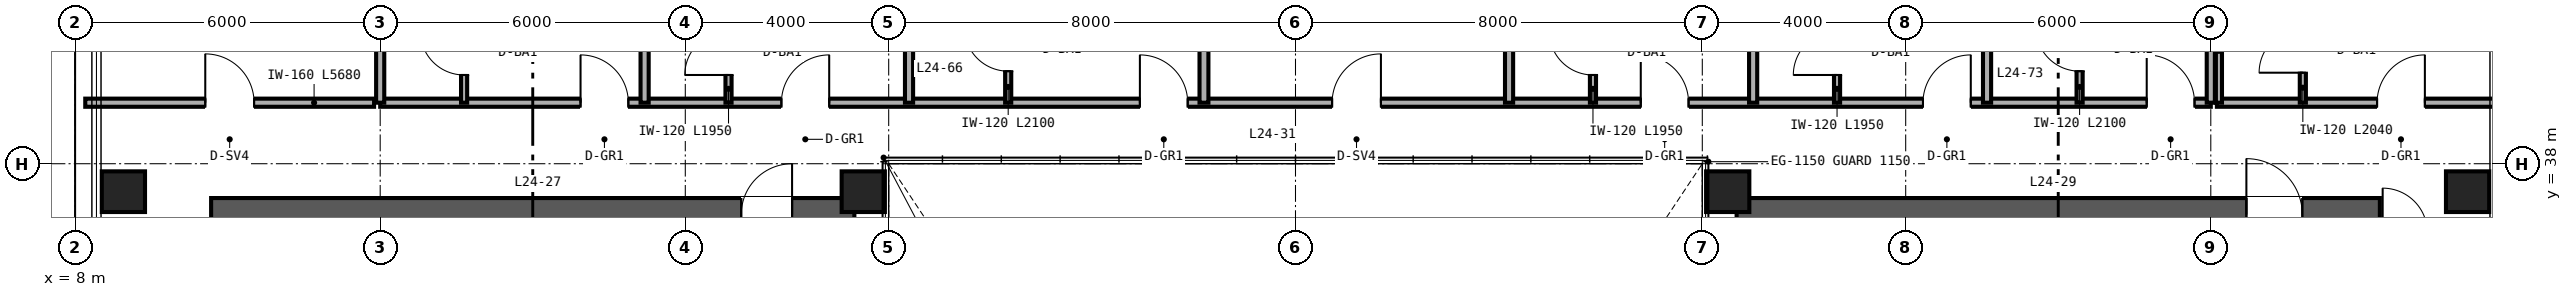
"""IFC4 building model, lengths in metres.
Left out: names, types, materials, properties, quantities, classifications, styles, units other than length and angle.
Written with IfcOpenShell. Run it as: python <this file> out.ifc"""

import sys

from ifc_helpers import new_model, si_unit, direction, frame, frame_2d, origin, origin_2d, place, context, subcontext, project, spatial, rectangle, hollow_rectangle, extrude, source, transform, mapped, element, fill, save


model = new_model("IFC4")
c1 = context("Model", 3, precision=1e-05, world=origin(), true_north=direction((0.0, 1.0)))
c2 = subcontext(c1, "Body", "Model", "MODEL_VIEW")
j1 = project(units=[si_unit("LENGTHUNIT", "METRE"), si_unit("PLANEANGLEUNIT", "RADIAN")], contexts=[c1])
p1 = place(None, origin())
s1 = spatial("IfcSite", under=j1, at=p1, CompositionType="ELEMENT")
p2 = place(p1, origin())
s2 = spatial("IfcBuilding", under=s1, at=p2, CompositionType="ELEMENT")
p3 = place(p2, frame((0.0, 0.0, 100.8)))
s3 = spatial("IfcBuildingStorey", under=s2, at=p3, CompositionType="ELEMENT", Elevation=100.8)
p4 = place(p3, frame((10.675, 37.0, 0.0), z_axis=(0.0, 0.0, 1.0), x_axis=(1.0, 0.0, 0.0)))
e1 = element("IfcWall", 1, at=p4, inside=s3, PredefinedType="SHEAR", context=c2, shape_type="SweptSolid", body=[
    extrude(rectangle(XDim=12.65, YDim=0.65, at=frame_2d((6.325, 0.0))), origin(), (0.0, 0.0, 1.0), 3.36),
])
p5 = place(p4, frame((10.425, 0.0, 0.0)))
e2 = element("IfcOpeningElement", 2, at=p5, cuts=e1, PredefinedType="OPENING", context=c2, shape_type="SweptSolid", body=[
    extrude(rectangle(XDim=1.0, YDim=2.15, at=frame_2d((0.5, 1.075))), frame((0.0, 0.335, 0.0), z_axis=(0.0, -1.0, 0.0), x_axis=(1.0, 0.0, 0.0)), (0.0, 0.0, 1.0), 0.67),
])
p6 = place(p3, frame((40.675, 37.0, 0.0), z_axis=(0.0, 0.0, 1.0), x_axis=(1.0, 0.0, 0.0)))
e3 = element("IfcWall", 3, at=p6, inside=s3, PredefinedType="SHEAR", context=c2, shape_type="SweptSolid", body=[
    extrude(rectangle(XDim=12.65, YDim=0.65, at=frame_2d((6.325, 0.0))), origin(), (0.0, 0.0, 1.0), 3.36),
])
p7 = place(p6, frame((10.025, 0.0, 0.0)))
e4 = element("IfcOpeningElement", 4, at=p7, cuts=e3, PredefinedType="OPENING", context=c2, shape_type="SweptSolid", body=[
    extrude(rectangle(XDim=1.1, YDim=2.15, at=frame_2d((0.55, 1.075))), frame((0.0, 0.335, 0.0), z_axis=(0.0, -1.0, 0.0), x_axis=(1.0, 0.0, 0.0)), (0.0, 0.0, 1.0), 0.67),
])
m1 = source(origin(), c2, "Body", "SweptSolid", [
    extrude(hollow_rectangle(XDim=0.85, YDim=0.8, WallThickness=0.032, at=origin_2d()), origin(), (0.0, 0.0, 1.0), 3.36),
])
for number, where, z_axis, x_axis in (
    (5, (8.95, 37.45, 0.0), (0.0, 0.0, 1.0), (1.0, 0.0, 0.0)),
    (6, (23.5, 37.45, 0.0), (0.0, 0.0, 1.0), (1.0, 0.0, 0.0)),
    (7, (40.5, 37.45, 0.0), (0.0, 0.0, 1.0), (1.0, 0.0, 0.0)),
    (8, (55.05, 37.45, 0.0), (0.0, 0.0, 1.0), (1.0, 0.0, 0.0)),
):
    element("IfcColumn", number, at=place(p3, frame(where, z_axis=z_axis, x_axis=x_axis)), inside=s3, PredefinedType="COLUMN", context=c2, shape_type="MappedRepresentation", body=[
        mapped(m1, transform((0.0, 0.0, 0.0), scale=1.0)),
    ])
p8 = place(p3, frame((8.2, 39.2, 0.0), z_axis=(0.0, 0.0, 1.0), x_axis=(1.0, 0.0, 0.0)))
e9 = element("IfcWall", 9, at=p8, inside=s3, PredefinedType="PARTITIONING", context=c2, shape_type="SweptSolid", body=[
    extrude(rectangle(XDim=5.68, YDim=0.16, at=frame_2d((2.84, 0.0))), origin(), (0.0, 0.0, 1.0), 3.36),
])
p9 = place(p8, frame((2.36, 0.0, 0.0)))
e10 = element("IfcOpeningElement", 10, at=p9, cuts=e9, PredefinedType="OPENING", context=c2, shape_type="SweptSolid", body=[
    extrude(rectangle(XDim=0.96, YDim=2.15, at=frame_2d((0.48, 1.075))), frame((0.0, 0.09, 0.0), z_axis=(0.0, -1.0, 0.0), x_axis=(1.0, 0.0, 0.0)), (0.0, 0.0, 1.0), 0.18),
])
p10 = place(p3, frame((50.12, 39.2, 0.0), z_axis=(0.0, 0.0, 1.0), x_axis=(1.0, 0.0, 0.0)))
e11 = element("IfcWall", 11, at=p10, inside=s3, PredefinedType="PARTITIONING", context=c2, shape_type="SweptSolid", body=[
    extrude(rectangle(XDim=5.68, YDim=0.16, at=frame_2d((2.84, 0.0))), origin(), (0.0, 0.0, 1.0), 3.36),
])
p11 = place(p10, frame((3.15, 0.0, 0.0)))
e12 = element("IfcOpeningElement", 12, at=p11, cuts=e11, PredefinedType="OPENING", context=c2, shape_type="SweptSolid", body=[
    extrude(rectangle(XDim=0.94, YDim=2.15, at=frame_2d((0.47, 1.075))), frame((0.0, 0.09, 0.0), z_axis=(0.0, -1.0, 0.0), x_axis=(1.0, 0.0, 0.0)), (0.0, 0.0, 1.0), 0.18),
])
p12 = place(p3, frame((51.81, 39.2, 0.0), z_axis=(0.0, 0.0, 1.0), x_axis=(0.0, 1.0, 0.0)))
e13 = element("IfcWall", 13, at=p12, inside=s3, PredefinedType="PARTITIONING", context=c2, shape_type="SweptSolid", body=[
    extrude(rectangle(XDim=2.04, YDim=0.12, at=frame_2d((1.02, 0.0))), origin(), (0.0, 0.0, 1.0), 3.36),
])
p13 = place(p12, frame((0.59, 0.0, 0.0)))
e14 = element("IfcOpeningElement", 14, at=p13, cuts=e13, PredefinedType="OPENING", context=c2, shape_type="SweptSolid", body=[
    extrude(rectangle(XDim=0.86, YDim=2.1, at=frame_2d((0.43, 1.05))), frame((0.0, 0.07, 0.0), z_axis=(0.0, -1.0, 0.0), x_axis=(1.0, 0.0, 0.0)), (0.0, 0.0, 1.0), 0.14),
])
p14 = place(p3, frame((50.16, 39.2, 0.0), z_axis=(0.0, 0.0, 1.0), x_axis=(0.0, 1.0, 0.0)))
e15 = element("IfcWall", 15, at=p14, inside=s3, PredefinedType="PARTITIONING", context=c2, shape_type="SweptSolid", body=[
    extrude(rectangle(XDim=2.04, YDim=0.12, at=frame_2d((1.02, 0.0))), origin(), (0.0, 0.0, 1.0), 3.36),
])
p15 = place(p3, frame((14.0, 39.2, 0.0), z_axis=(0.0, 0.0, 1.0), x_axis=(1.0, 0.0, 0.0)))
e16 = element("IfcWall", 16, at=p15, inside=s3, PredefinedType="PARTITIONING", context=c2, shape_type="SweptSolid", body=[
    extrude(rectangle(XDim=36.0, YDim=0.16, at=frame_2d((18.0, 0.0))), origin(), (0.0, 0.0, 1.0), 2.581),
])
p16 = place(p15, frame((3.94, 0.0, 0.0)))
e17 = element("IfcOpeningElement", 17, at=p16, cuts=e16, PredefinedType="OPENING", context=c2, shape_type="SweptSolid", body=[
    extrude(rectangle(XDim=0.94, YDim=2.15, at=frame_2d((0.47, 1.075))), frame((0.0, 0.09, 0.0), z_axis=(0.0, -1.0, 0.0), x_axis=(1.0, 0.0, 0.0)), (0.0, 0.0, 1.0), 0.18),
])
p17 = place(p15, frame((7.89, 0.0, 0.0)))
e18 = element("IfcOpeningElement", 18, at=p17, cuts=e16, PredefinedType="OPENING", context=c2, shape_type="SweptSolid", body=[
    extrude(rectangle(XDim=0.94, YDim=2.15, at=frame_2d((0.47, 1.075))), frame((0.0, 0.09, 0.0), z_axis=(0.0, -1.0, 0.0), x_axis=(1.0, 0.0, 0.0)), (0.0, 0.0, 1.0), 0.18),
])
p18 = place(p15, frame((14.94, 0.0, 0.0)))
e19 = element("IfcOpeningElement", 19, at=p18, cuts=e16, PredefinedType="OPENING", context=c2, shape_type="SweptSolid", body=[
    extrude(rectangle(XDim=0.94, YDim=2.15, at=frame_2d((0.47, 1.075))), frame((0.0, 0.09, 0.0), z_axis=(0.0, -1.0, 0.0), x_axis=(1.0, 0.0, 0.0)), (0.0, 0.0, 1.0), 0.18),
])
p19 = place(p15, frame((18.72, 0.0, 0.0)))
e20 = element("IfcOpeningElement", 20, at=p19, cuts=e16, PredefinedType="OPENING", context=c2, shape_type="SweptSolid", body=[
    extrude(rectangle(XDim=0.96, YDim=2.15, at=frame_2d((0.48, 1.075))), frame((0.0, 0.09, 0.0), z_axis=(0.0, -1.0, 0.0), x_axis=(1.0, 0.0, 0.0)), (0.0, 0.0, 1.0), 0.18),
])
p20 = place(p15, frame((24.79, 0.0, 0.0)))
e21 = element("IfcOpeningElement", 21, at=p20, cuts=e16, PredefinedType="OPENING", context=c2, shape_type="SweptSolid", body=[
    extrude(rectangle(XDim=0.94, YDim=2.15, at=frame_2d((0.47, 1.075))), frame((0.0, 0.09, 0.0), z_axis=(0.0, -1.0, 0.0), x_axis=(1.0, 0.0, 0.0)), (0.0, 0.0, 1.0), 0.18),
])
p21 = place(p15, frame((30.34, 0.0, 0.0)))
e22 = element("IfcOpeningElement", 22, at=p21, cuts=e16, PredefinedType="OPENING", context=c2, shape_type="SweptSolid", body=[
    extrude(rectangle(XDim=0.94, YDim=2.15, at=frame_2d((0.47, 1.075))), frame((0.0, 0.09, 0.0), z_axis=(0.0, -1.0, 0.0), x_axis=(1.0, 0.0, 0.0)), (0.0, 0.0, 1.0), 0.18),
])
p22 = place(p15, frame((34.74, 0.0, 0.0)))
e23 = element("IfcOpeningElement", 23, at=p22, cuts=e16, PredefinedType="OPENING", context=c2, shape_type="SweptSolid", body=[
    extrude(rectangle(XDim=0.94, YDim=2.15, at=frame_2d((0.47, 1.075))), frame((0.0, 0.09, 0.0), z_axis=(0.0, -1.0, 0.0), x_axis=(1.0, 0.0, 0.0)), (0.0, 0.0, 1.0), 0.18),
])
for number, where, z_axis, x_axis in (
    (24, (14.0, 39.2, 0.0), (0.0, 0.0, 1.0), (0.0, 1.0, 0.0)),
    (25, (50.0, 39.2, 0.0), (0.0, 0.0, 1.0), (0.0, 1.0, 0.0)),
    (26, (19.2, 39.2, 0.0), (0.0, 0.0, 1.0), (0.0, 1.0, 0.0)),
):
    element("IfcWall", number, at=place(p3, frame(where, z_axis=z_axis, x_axis=x_axis)), inside=s3, PredefinedType="PARTITIONING", context=c2, shape_type="SweptSolid", body=[
        extrude(rectangle(XDim=10.44, YDim=0.16, at=frame_2d((5.22, 0.0))), origin(), (0.0, 0.0, 1.0), 2.667),
    ])
p23 = place(p3, frame((15.65, 39.2, 0.0), z_axis=(0.0, 0.0, 1.0), x_axis=(0.0, 1.0, 0.0)))
e27 = element("IfcWall", 27, at=p23, inside=s3, PredefinedType="PARTITIONING", context=c2, shape_type="SweptSolid", body=[
    extrude(rectangle(XDim=1.95, YDim=0.12, at=frame_2d((0.975, 0.0))), origin(), (0.0, 0.0, 1.0), 3.36),
])
p24 = place(p23, frame((0.545, 0.0, 0.0)))
e28 = element("IfcOpeningElement", 28, at=p24, cuts=e27, PredefinedType="OPENING", context=c2, shape_type="SweptSolid", body=[
    extrude(rectangle(XDim=0.86, YDim=2.1, at=frame_2d((0.43, 1.05))), frame((0.0, 0.07, 0.0), z_axis=(0.0, -1.0, 0.0), x_axis=(1.0, 0.0, 0.0)), (0.0, 0.0, 1.0), 0.14),
])
p25 = place(p3, frame((24.4, 39.2, 0.0), z_axis=(0.0, 0.0, 1.0), x_axis=(0.0, 1.0, 0.0)))
e29 = element("IfcWall", 29, at=p25, inside=s3, PredefinedType="PARTITIONING", context=c2, shape_type="SweptSolid", body=[
    extrude(rectangle(XDim=10.44, YDim=0.16, at=frame_2d((5.22, 0.0))), origin(), (0.0, 0.0, 1.0), 2.433),
])
p26 = place(p3, frame((20.85, 39.2, 0.0), z_axis=(0.0, 0.0, 1.0), x_axis=(0.0, 1.0, 0.0)))
e30 = element("IfcWall", 30, at=p26, inside=s3, PredefinedType="PARTITIONING", context=c2, shape_type="SweptSolid", body=[
    extrude(rectangle(XDim=1.95, YDim=0.12, at=frame_2d((0.975, 0.0))), origin(), (0.0, 0.0, 1.0), 3.36),
])
p27 = place(p26, frame((0.545, 0.0, 0.0)))
e31 = element("IfcOpeningElement", 31, at=p27, cuts=e30, PredefinedType="OPENING", context=c2, shape_type="SweptSolid", body=[
    extrude(rectangle(XDim=0.86, YDim=2.1, at=frame_2d((0.43, 1.05))), frame((0.0, 0.07, 0.0), z_axis=(0.0, -1.0, 0.0), x_axis=(1.0, 0.0, 0.0)), (0.0, 0.0, 1.0), 0.14),
])
p28 = place(p3, frame((30.2, 39.2, 0.0), z_axis=(0.0, 0.0, 1.0), x_axis=(0.0, 1.0, 0.0)))
e32 = element("IfcWall", 32, at=p28, inside=s3, PredefinedType="PARTITIONING", context=c2, shape_type="SweptSolid", body=[
    extrude(rectangle(XDim=10.44, YDim=0.175, at=frame_2d((5.22, 0.0))), origin(), (0.0, 0.0, 1.0), 2.433),
])
p29 = place(p3, frame((26.35, 39.2, 0.0), z_axis=(0.0, 0.0, 1.0), x_axis=(0.0, 1.0, 0.0)))
e33 = element("IfcWall", 33, at=p29, inside=s3, PredefinedType="PARTITIONING", context=c2, shape_type="SweptSolid", body=[
    extrude(rectangle(XDim=2.1, YDim=0.12, at=frame_2d((1.05, 0.0))), origin(), (0.0, 0.0, 1.0), 3.36),
])
p30 = place(p29, frame((0.62, 0.0, 0.0)))
e34 = element("IfcOpeningElement", 34, at=p30, cuts=e33, PredefinedType="OPENING", context=c2, shape_type="SweptSolid", body=[
    extrude(rectangle(XDim=0.86, YDim=2.1, at=frame_2d((0.43, 1.05))), frame((0.0, 0.07, 0.0), z_axis=(0.0, -1.0, 0.0), x_axis=(1.0, 0.0, 0.0)), (0.0, 0.0, 1.0), 0.14),
])
p31 = place(p3, frame((36.2, 39.2, 0.0), z_axis=(0.0, 0.0, 1.0), x_axis=(0.0, 1.0, 0.0)))
e35 = element("IfcWall", 35, at=p31, inside=s3, PredefinedType="PARTITIONING", context=c2, shape_type="SweptSolid", body=[
    extrude(rectangle(XDim=10.44, YDim=0.16, at=frame_2d((5.22, 0.0))), origin(), (0.0, 0.0, 1.0), 2.433),
])
p32 = place(p3, frame((41.0, 39.2, 0.0), z_axis=(0.0, 0.0, 1.0), x_axis=(0.0, 1.0, 0.0)))
e36 = element("IfcWall", 36, at=p32, inside=s3, PredefinedType="PARTITIONING", context=c2, shape_type="SweptSolid", body=[
    extrude(rectangle(XDim=10.44, YDim=0.16, at=frame_2d((5.22, 0.0))), origin(), (0.0, 0.0, 1.0), 2.823),
])
p33 = place(p3, frame((37.85, 39.2, 0.0), z_axis=(0.0, 0.0, 1.0), x_axis=(0.0, 1.0, 0.0)))
e37 = element("IfcWall", 37, at=p33, inside=s3, PredefinedType="PARTITIONING", context=c2, shape_type="SweptSolid", body=[
    extrude(rectangle(XDim=1.95, YDim=0.12, at=frame_2d((0.975, 0.0))), origin(), (0.0, 0.0, 1.0), 3.36),
])
p34 = place(p33, frame((0.545, 0.0, 0.0)))
e38 = element("IfcOpeningElement", 38, at=p34, cuts=e37, PredefinedType="OPENING", context=c2, shape_type="SweptSolid", body=[
    extrude(rectangle(XDim=0.86, YDim=2.1, at=frame_2d((0.43, 1.05))), frame((0.0, 0.07, 0.0), z_axis=(0.0, -1.0, 0.0), x_axis=(1.0, 0.0, 0.0)), (0.0, 0.0, 1.0), 0.14),
])
p35 = place(p3, frame((45.6, 39.2, 0.0), z_axis=(0.0, 0.0, 1.0), x_axis=(0.0, 1.0, 0.0)))
e39 = element("IfcWall", 39, at=p35, inside=s3, PredefinedType="PARTITIONING", context=c2, shape_type="SweptSolid", body=[
    extrude(rectangle(XDim=10.44, YDim=0.16, at=frame_2d((5.22, 0.0))), origin(), (0.0, 0.0, 1.0), 2.667),
])
p36 = place(p3, frame((42.65, 39.2, 0.0), z_axis=(0.0, 0.0, 1.0), x_axis=(0.0, 1.0, 0.0)))
e40 = element("IfcWall", 40, at=p36, inside=s3, PredefinedType="PARTITIONING", context=c2, shape_type="SweptSolid", body=[
    extrude(rectangle(XDim=1.95, YDim=0.12, at=frame_2d((0.975, 0.0))), origin(), (0.0, 0.0, 1.0), 3.36),
])
p37 = place(p36, frame((0.545, 0.0, 0.0)))
e41 = element("IfcOpeningElement", 41, at=p37, cuts=e40, PredefinedType="OPENING", context=c2, shape_type="SweptSolid", body=[
    extrude(rectangle(XDim=0.86, YDim=2.1, at=frame_2d((0.43, 1.05))), frame((0.0, 0.07, 0.0), z_axis=(0.0, -1.0, 0.0), x_axis=(1.0, 0.0, 0.0)), (0.0, 0.0, 1.0), 0.14),
])
p38 = place(p3, frame((47.42, 39.2, 0.0), z_axis=(0.0, 0.0, 1.0), x_axis=(0.0, 1.0, 0.0)))
e42 = element("IfcWall", 42, at=p38, inside=s3, PredefinedType="PARTITIONING", context=c2, shape_type="SweptSolid", body=[
    extrude(rectangle(XDim=2.1, YDim=0.12, at=frame_2d((1.05, 0.0))), origin(), (0.0, 0.0, 1.0), 3.36),
])
p39 = place(p38, frame((0.62, 0.0, 0.0)))
e43 = element("IfcOpeningElement", 43, at=p39, cuts=e42, PredefinedType="OPENING", context=c2, shape_type="SweptSolid", body=[
    extrude(rectangle(XDim=0.86, YDim=2.1, at=frame_2d((0.43, 1.05))), frame((0.0, 0.07, 0.0), z_axis=(0.0, -1.0, 0.0), x_axis=(1.0, 0.0, 0.0)), (0.0, 0.0, 1.0), 0.14),
])
m2 = source(origin(), c2, "Body", "SweptSolid", [
    extrude(rectangle(XDim=1.0, YDim=2.15, at=frame_2d((0.5, 1.075))), frame((0.0, 0.025, 0.0), z_axis=(0.0, -1.0, 0.0), x_axis=(1.0, 0.0, 0.0)), (0.0, 0.0, 1.0), 0.05),
])
p40 = place(p5, origin())
e44 = element("IfcDoor", 44, at=p40, inside=s3, OperationType="SINGLE_SWING_RIGHT", PredefinedType="DOOR", context=c2, shape_type="MappedRepresentation", body=[
    mapped(m2, transform((0.0, 0.0, 0.0), scale=1.0)),
])
fill(e2, e44)
m3 = source(origin(), c2, "Body", "SweptSolid", [
    extrude(rectangle(XDim=1.1, YDim=2.15, at=frame_2d((0.55, 1.075))), frame((0.0, 0.025, 0.0), z_axis=(0.0, -1.0, 0.0), x_axis=(1.0, 0.0, 0.0)), (0.0, 0.0, 1.0), 0.05),
])
p41 = place(p7, origin())
e45 = element("IfcDoor", 45, at=p41, inside=s3, OperationType="SINGLE_SWING_LEFT", PredefinedType="DOOR", context=c2, shape_type="MappedRepresentation", body=[
    mapped(m3, transform((0.0, 0.0, 0.0), scale=1.0)),
])
fill(e4, e45)
m4 = source(origin(), c2, "Body", "SweptSolid", [
    extrude(rectangle(XDim=0.96, YDim=2.15, at=frame_2d((0.48, 1.075))), frame((0.0, 0.025, 0.0), z_axis=(0.0, -1.0, 0.0), x_axis=(1.0, 0.0, 0.0)), (0.0, 0.0, 1.0), 0.05),
])
p42 = place(p9, origin())
e46 = element("IfcDoor", 46, at=p42, inside=s3, OperationType="SINGLE_SWING_LEFT", PredefinedType="DOOR", context=c2, shape_type="MappedRepresentation", body=[
    mapped(m4, transform((0.0, 0.0, 0.0), scale=1.0)),
])
fill(e10, e46)
m5 = source(origin(), c2, "Body", "SweptSolid", [
    extrude(rectangle(XDim=0.86, YDim=2.1, at=frame_2d((0.43, 1.05))), frame((0.0, 0.025, 0.0), z_axis=(0.0, -1.0, 0.0), x_axis=(1.0, 0.0, 0.0)), (0.0, 0.0, 1.0), 0.05),
])
p43 = place(p13, origin())
e47 = element("IfcDoor", 47, at=p43, inside=s3, OperationType="SINGLE_SWING_LEFT", PredefinedType="DOOR", context=c2, shape_type="MappedRepresentation", body=[
    mapped(m5, transform((0.0, 0.0, 0.0), scale=1.0)),
])
fill(e14, e47)
m6 = source(origin(), c2, "Body", "SweptSolid", [
    extrude(rectangle(XDim=0.94, YDim=2.15, at=frame_2d((0.47, 1.075))), frame((0.0, 0.025, 0.0), z_axis=(0.0, -1.0, 0.0), x_axis=(1.0, 0.0, 0.0)), (0.0, 0.0, 1.0), 0.05),
])
p44 = place(p11, origin())
e48 = element("IfcDoor", 48, at=p44, inside=s3, OperationType="SINGLE_SWING_RIGHT", PredefinedType="DOOR", context=c2, shape_type="MappedRepresentation", body=[
    mapped(m6, transform((0.0, 0.0, 0.0), scale=1.0)),
])
fill(e12, e48)
p45 = place(p24, origin())
e49 = element("IfcDoor", 49, at=p45, inside=s3, OperationType="SINGLE_SWING_RIGHT", PredefinedType="DOOR", context=c2, shape_type="MappedRepresentation", body=[
    mapped(m5, transform((0.0, 0.0, 0.0), scale=1.0)),
])
fill(e28, e49)
p46 = place(p27, origin())
e50 = element("IfcDoor", 50, at=p46, inside=s3, OperationType="SINGLE_SWING_LEFT", PredefinedType="DOOR", context=c2, shape_type="MappedRepresentation", body=[
    mapped(m5, transform((0.0, 0.0, 0.0), scale=1.0)),
])
fill(e31, e50)
p47 = place(p30, origin())
e51 = element("IfcDoor", 51, at=p47, inside=s3, OperationType="SINGLE_SWING_RIGHT", PredefinedType="DOOR", context=c2, shape_type="MappedRepresentation", body=[
    mapped(m5, transform((0.0, 0.0, 0.0), scale=1.0)),
])
fill(e34, e51)
p48 = place(p34, origin())
e52 = element("IfcDoor", 52, at=p48, inside=s3, OperationType="SINGLE_SWING_RIGHT", PredefinedType="DOOR", context=c2, shape_type="MappedRepresentation", body=[
    mapped(m5, transform((0.0, 0.0, 0.0), scale=1.0)),
])
fill(e38, e52)
p49 = place(p37, origin())
e53 = element("IfcDoor", 53, at=p49, inside=s3, OperationType="SINGLE_SWING_LEFT", PredefinedType="DOOR", context=c2, shape_type="MappedRepresentation", body=[
    mapped(m5, transform((0.0, 0.0, 0.0), scale=1.0)),
])
fill(e41, e53)
p50 = place(p39, origin())
e54 = element("IfcDoor", 54, at=p50, inside=s3, OperationType="SINGLE_SWING_RIGHT", PredefinedType="DOOR", context=c2, shape_type="MappedRepresentation", body=[
    mapped(m5, transform((0.0, 0.0, 0.0), scale=1.0)),
])
fill(e43, e54)
p51 = place(p16, origin())
e55 = element("IfcDoor", 55, at=p51, inside=s3, OperationType="SINGLE_SWING_LEFT", PredefinedType="DOOR", context=c2, shape_type="MappedRepresentation", body=[
    mapped(m6, transform((0.0, 0.0, 0.0), scale=1.0)),
])
fill(e17, e55)
p52 = place(p17, origin())
e56 = element("IfcDoor", 56, at=p52, inside=s3, OperationType="SINGLE_SWING_RIGHT", PredefinedType="DOOR", context=c2, shape_type="MappedRepresentation", body=[
    mapped(m6, transform((0.0, 0.0, 0.0), scale=1.0)),
])
fill(e18, e56)
p53 = place(p18, origin())
e57 = element("IfcDoor", 57, at=p53, inside=s3, OperationType="SINGLE_SWING_LEFT", PredefinedType="DOOR", context=c2, shape_type="MappedRepresentation", body=[
    mapped(m6, transform((0.0, 0.0, 0.0), scale=1.0)),
])
fill(e19, e57)
p54 = place(p19, origin())
e58 = element("IfcDoor", 58, at=p54, inside=s3, OperationType="SINGLE_SWING_RIGHT", PredefinedType="DOOR", context=c2, shape_type="MappedRepresentation", body=[
    mapped(m4, transform((0.0, 0.0, 0.0), scale=1.0)),
])
fill(e20, e58)
p55 = place(p20, origin())
e59 = element("IfcDoor", 59, at=p55, inside=s3, OperationType="SINGLE_SWING_LEFT", PredefinedType="DOOR", context=c2, shape_type="MappedRepresentation", body=[
    mapped(m6, transform((0.0, 0.0, 0.0), scale=1.0)),
])
fill(e21, e59)
p56 = place(p21, origin())
e60 = element("IfcDoor", 60, at=p56, inside=s3, OperationType="SINGLE_SWING_RIGHT", PredefinedType="DOOR", context=c2, shape_type="MappedRepresentation", body=[
    mapped(m6, transform((0.0, 0.0, 0.0), scale=1.0)),
])
fill(e22, e60)
p57 = place(p22, origin())
e61 = element("IfcDoor", 61, at=p57, inside=s3, OperationType="SINGLE_SWING_LEFT", PredefinedType="DOOR", context=c2, shape_type="MappedRepresentation", body=[
    mapped(m6, transform((0.0, 0.0, 0.0), scale=1.0)),
])
fill(e23, e61)
save(model, sys.argv[1])
